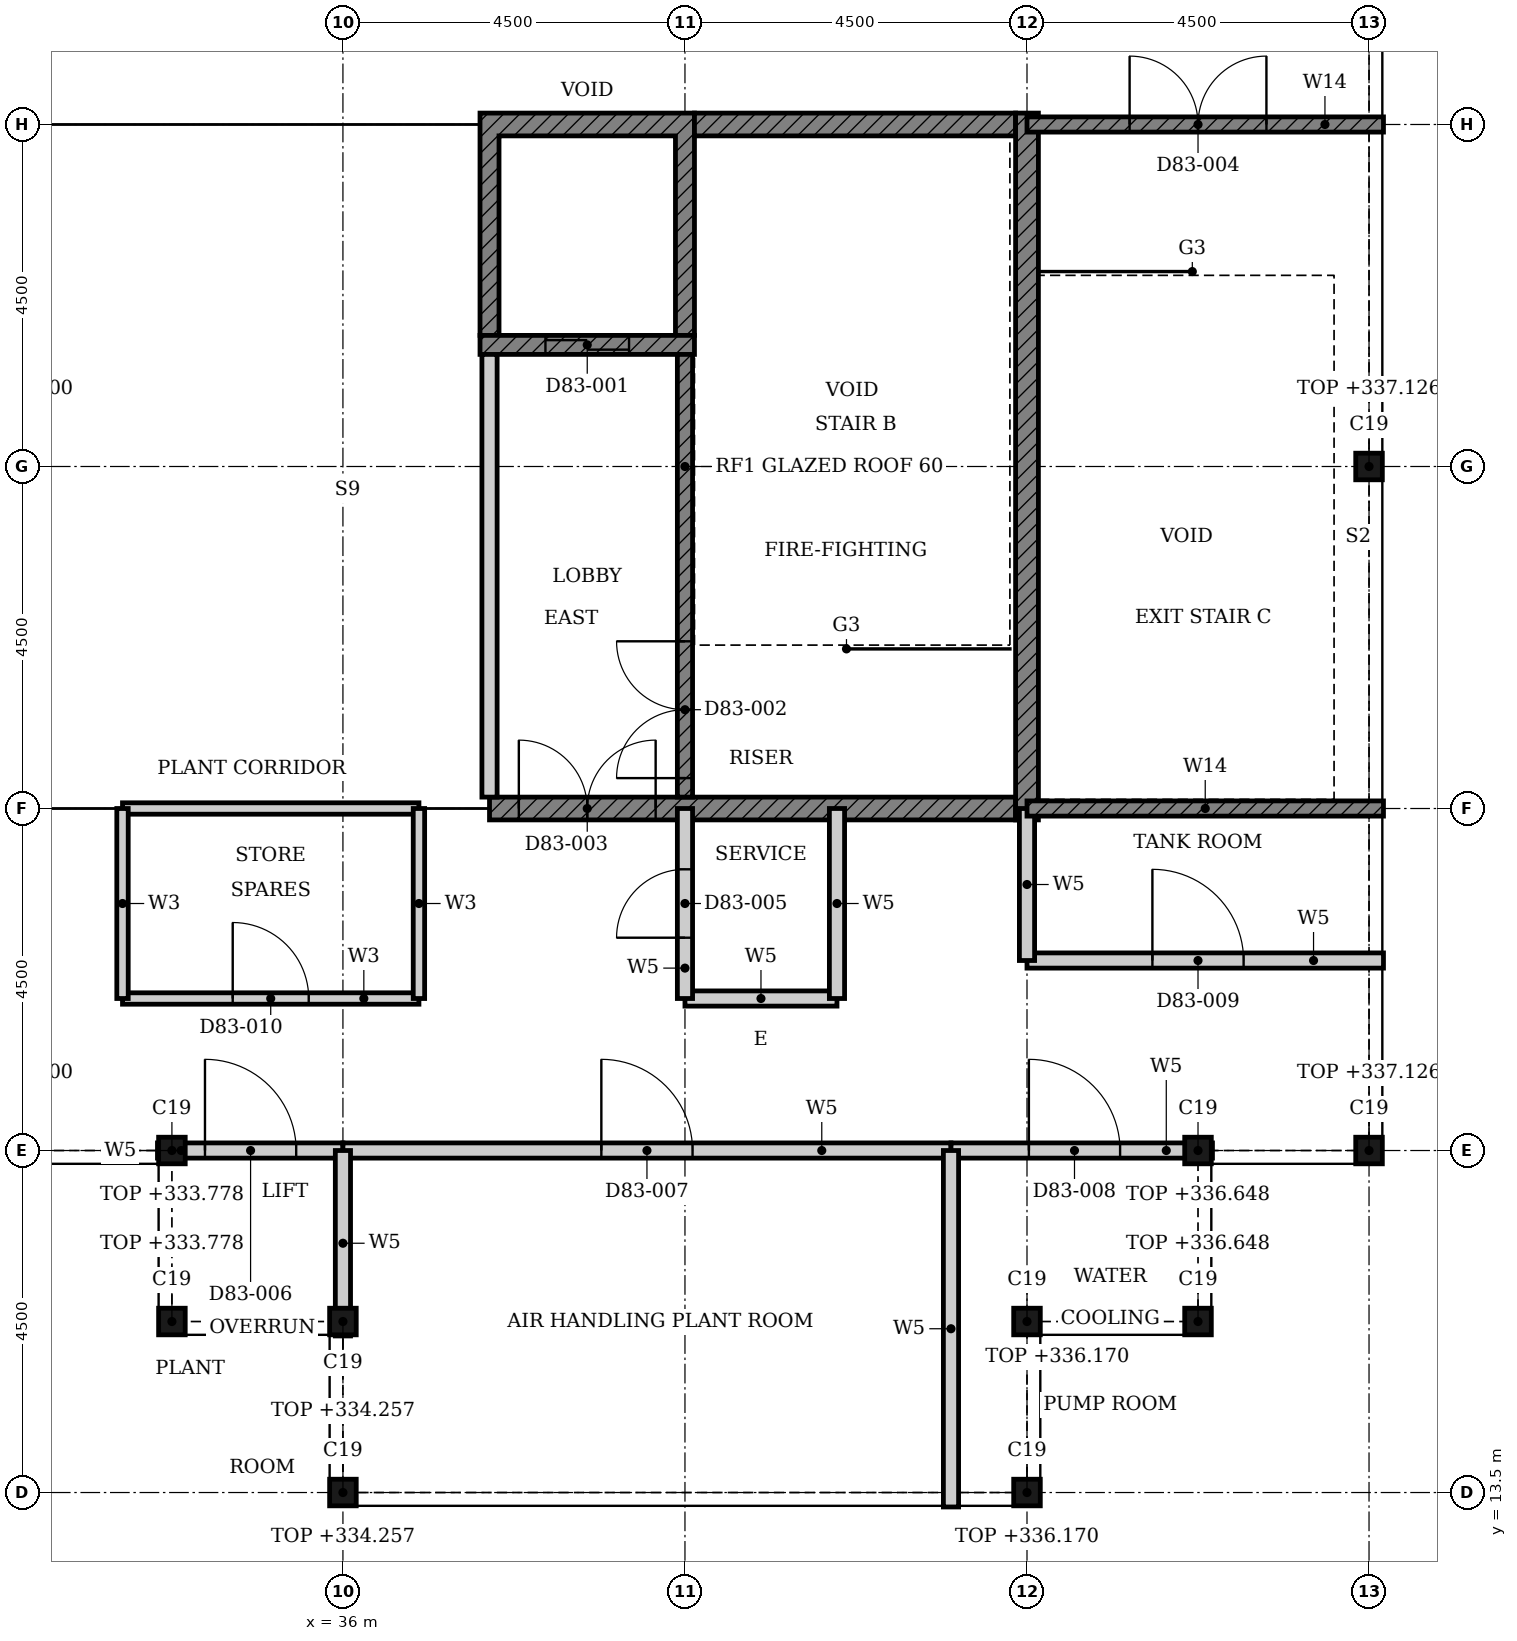
"""IFC4 building model, lengths in metres.
Left out: names, types, materials, properties, quantities, classifications, styles, units other than length and angle.
Written with IfcOpenShell. Run it as: python <this file> out.ifc"""

import sys

from ifc_helpers import new_model, si_unit, direction, frame, frame_2d, origin, origin_2d, place, context, subcontext, project, spatial, polyline, rectangle, i_section, outline, extrude, element, fill, save


model = new_model("IFC4")
c1 = context("Model", 3, precision=1e-05, world=origin(), true_north=direction((0.0, 1.0)))
c2 = subcontext(c1, "Body", "Model", "MODEL_VIEW")
j1 = project(units=[si_unit("LENGTHUNIT", "METRE"), si_unit("PLANEANGLEUNIT", "RADIAN")], contexts=[c1])
p1 = place(None, origin())
s1 = spatial("IfcSite", under=j1, at=p1, CompositionType="ELEMENT")
p2 = place(p1, origin())
s2 = spatial("IfcBuilding", under=s1, at=p2, CompositionType="ELEMENT")
p3 = place(p2, frame((0.0, 0.0, 329.6)))
s3 = spatial("IfcBuildingStorey", under=s2, at=p3, CompositionType="ELEMENT", Elevation=329.6)
for number, where, z_axis, x_axis in (
    (1, (45.0, 13.5, 0.0), (0.0, 0.0, 1.0), (1.0, 0.0, 0.0)),
    (2, (45.0, 15.75, 0.0), (0.0, 0.0, 1.0), (1.0, 0.0, 0.0)),
):
    element("IfcColumn", number, at=place(p3, frame(where, z_axis=z_axis, x_axis=x_axis)), inside=s3, PredefinedType="COLUMN", context=c2, shape_type="SweptSolid", body=[
        extrude(i_section(OverallWidth=0.35, OverallDepth=0.35, WebThickness=0.012, FlangeThickness=0.019, FilletRadius=0.013, at=origin_2d()), origin(), (0.0, 0.0, 1.0), 6.569),
    ])
for number, where, z_axis, x_axis in (
    (3, (47.25, 15.75, 0.0), (0.0, 0.0, 1.0), (1.0, 0.0, 0.0)),
    (4, (47.25, 18.0, 0.0), (0.0, 0.0, 1.0), (1.0, 0.0, 0.0)),
):
    element("IfcColumn", number, at=place(p3, frame(where, z_axis=z_axis, x_axis=x_axis)), inside=s3, PredefinedType="COLUMN", context=c2, shape_type="SweptSolid", body=[
        extrude(i_section(OverallWidth=0.35, OverallDepth=0.35, WebThickness=0.012, FlangeThickness=0.019, FilletRadius=0.013, at=origin_2d()), origin(), (0.0, 0.0, 1.0), 7.048),
    ])
for number, where, z_axis, x_axis in (
    (5, (49.5, 18.0, 0.0), (0.0, 0.0, 1.0), (1.0, 0.0, 0.0)),
    (6, (49.5, 27.0, 0.0), (0.0, 0.0, 1.0), (1.0, 0.0, 0.0)),
):
    element("IfcColumn", number, at=place(p3, frame(where, z_axis=z_axis, x_axis=x_axis)), inside=s3, PredefinedType="COLUMN", context=c2, shape_type="SweptSolid", body=[
        extrude(i_section(OverallWidth=0.35, OverallDepth=0.35, WebThickness=0.012, FlangeThickness=0.019, FilletRadius=0.013, at=origin_2d()), origin(), (0.0, 0.0, 1.0), 7.526),
    ])
for number, where, z_axis, x_axis in (
    (7, (33.75, 18.0, 0.0), (0.0, 0.0, 1.0), (1.0, 0.0, 0.0)),
    (8, (33.75, 15.75, 0.0), (0.0, 0.0, 1.0), (1.0, 0.0, 0.0)),
):
    element("IfcColumn", number, at=place(p3, frame(where, z_axis=z_axis, x_axis=x_axis)), inside=s3, PredefinedType="COLUMN", context=c2, shape_type="SweptSolid", body=[
        extrude(i_section(OverallWidth=0.35, OverallDepth=0.35, WebThickness=0.012, FlangeThickness=0.019, FilletRadius=0.013, at=origin_2d()), origin(), (0.0, 0.0, 1.0), 4.178),
    ])
for number, where, z_axis, x_axis in (
    (9, (36.0, 15.75, 0.0), (0.0, 0.0, 1.0), (1.0, 0.0, 0.0)),
    (10, (36.0, 13.5, 0.0), (0.0, 0.0, 1.0), (1.0, 0.0, 0.0)),
):
    element("IfcColumn", number, at=place(p3, frame(where, z_axis=z_axis, x_axis=x_axis)), inside=s3, PredefinedType="COLUMN", context=c2, shape_type="SweptSolid", body=[
        extrude(i_section(OverallWidth=0.35, OverallDepth=0.35, WebThickness=0.012, FlangeThickness=0.019, FilletRadius=0.013, at=origin_2d()), origin(), (0.0, 0.0, 1.0), 4.656),
    ])
p4 = place(p3, origin())
e11 = element("IfcWall", 11, at=p4, inside=s3, PredefinedType="SHEAR", context=c2, shape_type="SweptSolid", body=[
    extrude(outline(polyline([(37.803, 28.725), (38.053, 28.725), (38.053, 31.35), (40.375, 31.35), (40.375, 28.725), (40.625, 28.725), (40.625, 31.65), (37.803, 31.65), (37.803, 28.725)])), origin(), (0.0, 0.0, 1.0), 3.9),
])
p5 = place(p3, frame((37.928, 22.5, 0.0), z_axis=(0.0, 0.0, 1.0), x_axis=(1.0, 0.0, 0.0)))
e12 = element("IfcWall", 12, at=p5, inside=s3, PredefinedType="SHEAR", context=c2, shape_type="SweptSolid", body=[
    extrude(rectangle(XDim=6.922, YDim=0.3, at=frame_2d((3.461, 0.0))), origin(), (0.0, 0.0, 1.0), 3.9),
])
p6 = place(p5, frame((0.386, 0.0, 0.0)))
e13 = element("IfcOpeningElement", 13, at=p6, cuts=e12, PredefinedType="OPENING", context=c2, shape_type="SweptSolid", body=[
    extrude(rectangle(XDim=1.8, YDim=2.1, at=frame_2d((0.9, 1.05))), frame((0.0, 0.16, 0.0), z_axis=(0.0, -1.0, 0.0), x_axis=(1.0, 0.0, 0.0)), (0.0, 0.0, 1.0), 0.32),
])
p7 = place(p3, frame((40.625, 31.5, 0.0), z_axis=(0.0, 0.0, 1.0), x_axis=(1.0, 0.0, 0.0)))
e14 = element("IfcWall", 14, at=p7, inside=s3, PredefinedType="SHEAR", context=c2, shape_type="SweptSolid", body=[
    extrude(rectangle(XDim=4.225, YDim=0.3, at=frame_2d((2.113, 0.0))), origin(), (0.0, 0.0, 1.0), 3.9),
])
p8 = place(p3, frame((45.0, 22.35, 0.0), z_axis=(0.0, 0.0, 1.0), x_axis=(0.0, 1.0, 0.0)))
e15 = element("IfcWall", 15, at=p8, inside=s3, PredefinedType="SHEAR", context=c2, shape_type="SweptSolid", body=[
    extrude(rectangle(XDim=9.3, YDim=0.3, at=frame_2d((4.65, 0.0))), origin(), (0.0, 0.0, 1.0), 3.9),
])
p9 = place(p3, frame((37.803, 28.6, 0.0), z_axis=(0.0, 0.0, 1.0), x_axis=(1.0, 0.0, 0.0)))
e16 = element("IfcWall", 16, at=p9, inside=s3, PredefinedType="SHEAR", context=c2, shape_type="SweptSolid", body=[
    extrude(rectangle(XDim=2.822, YDim=0.25, at=frame_2d((1.411, 0.0))), origin(), (0.0, 0.0, 1.0), 3.9),
])
p10 = place(p9, frame((0.861, 0.0, 0.0)))
e17 = element("IfcOpeningElement", 17, at=p10, cuts=e16, PredefinedType="OPENING", context=c2, shape_type="SweptSolid", body=[
    extrude(rectangle(XDim=1.1, YDim=2.1, at=frame_2d((0.55, 1.05))), frame((0.0, 0.135, 0.0), z_axis=(0.0, -1.0, 0.0), x_axis=(1.0, 0.0, 0.0)), (0.0, 0.0, 1.0), 0.27),
])
p11 = place(p3, frame((40.5, 22.65, 0.0), z_axis=(0.0, 0.0, 1.0), x_axis=(0.0, 1.0, 0.0)))
e18 = element("IfcWall", 18, at=p11, inside=s3, PredefinedType="SHEAR", context=c2, shape_type="SweptSolid", body=[
    extrude(rectangle(XDim=5.825, YDim=0.2, at=frame_2d((2.913, 0.0))), origin(), (0.0, 0.0, 1.0), 3.9),
])
p12 = place(p11, frame((0.25, 0.0, 0.0)))
e19 = element("IfcOpeningElement", 19, at=p12, cuts=e18, PredefinedType="OPENING", context=c2, shape_type="SweptSolid", body=[
    extrude(rectangle(XDim=1.8, YDim=2.1, at=frame_2d((0.9, 1.05))), frame((0.0, 0.11, 0.0), z_axis=(0.0, -1.0, 0.0), x_axis=(1.0, 0.0, 0.0)), (0.0, 0.0, 1.0), 0.22),
])
p13 = place(p3, frame((37.928, 22.65, 0.0), z_axis=(0.0, 0.0, 1.0), x_axis=(0.0, 1.0, 0.0)))
e20 = element("IfcWall", 20, at=p13, inside=s3, PredefinedType="PARTITIONING", context=c2, shape_type="SweptSolid", body=[
    extrude(rectangle(XDim=5.825, YDim=0.2, at=frame_2d((2.913, 0.0))), origin(), (0.0, 0.0, 1.0), 3.9),
])
p14 = place(p3, frame((33.1, 20.0, 0.0), z_axis=(0.0, 0.0, 1.0), x_axis=(1.0, 0.0, 0.0)))
e21 = element("IfcWall", 21, at=p14, inside=s3, PredefinedType="PARTITIONING", context=c2, shape_type="SweptSolid", body=[
    extrude(rectangle(XDim=3.9, YDim=0.15, at=frame_2d((1.95, 0.0))), origin(), (0.0, 0.0, 1.0), 3.9),
])
p15 = place(p14, frame((1.45, 0.0, 0.0)))
e22 = element("IfcOpeningElement", 22, at=p15, cuts=e21, PredefinedType="OPENING", context=c2, shape_type="SweptSolid", body=[
    extrude(rectangle(XDim=1.0, YDim=2.1, at=frame_2d((0.5, 1.05))), frame((0.0, 0.085, 0.0), z_axis=(0.0, -1.0, 0.0), x_axis=(1.0, 0.0, 0.0)), (0.0, 0.0, 1.0), 0.17),
])
p16 = place(p3, frame((33.1, 22.5, 0.0), z_axis=(0.0, 0.0, 1.0), x_axis=(1.0, 0.0, 0.0)))
e23 = element("IfcWall", 23, at=p16, inside=s3, PredefinedType="PARTITIONING", context=c2, shape_type="SweptSolid", body=[
    extrude(rectangle(XDim=3.9, YDim=0.15, at=frame_2d((1.95, 0.0))), origin(), (0.0, 0.0, 1.0), 3.9),
])
for number, where, z_axis, x_axis in (
    (24, (33.1, 20.0, 0.0), (0.0, 0.0, 1.0), (0.0, 1.0, 0.0)),
    (25, (37.0, 20.0, 0.0), (0.0, 0.0, 1.0), (0.0, 1.0, 0.0)),
):
    element("IfcWall", number, at=place(p3, frame(where, z_axis=z_axis, x_axis=x_axis)), inside=s3, PredefinedType="PARTITIONING", context=c2, shape_type="SweptSolid", body=[
        extrude(rectangle(XDim=2.5, YDim=0.15, at=frame_2d((1.25, 0.0))), origin(), (0.0, 0.0, 1.0), 3.9),
    ])
p17 = place(p3, frame((33.56, 18.0, 0.0), z_axis=(0.0, 0.0, 1.0), x_axis=(1.0, 0.0, 0.0)))
e26 = element("IfcWall", 26, at=p17, inside=s3, PredefinedType="PARTITIONING", context=c2, shape_type="SweptSolid", body=[
    extrude(rectangle(XDim=2.44, YDim=0.2, at=frame_2d((1.22, 0.0))), origin(), (0.0, 0.0, 1.0), 3.9),
])
p18 = place(p17, frame((0.625, 0.0, 0.0)))
e27 = element("IfcOpeningElement", 27, at=p18, cuts=e26, PredefinedType="OPENING", context=c2, shape_type="SweptSolid", body=[
    extrude(rectangle(XDim=1.2, YDim=2.1, at=frame_2d((0.6, 1.05))), frame((0.0, 0.11, 0.0), z_axis=(0.0, -1.0, 0.0), x_axis=(1.0, 0.0, 0.0)), (0.0, 0.0, 1.0), 0.22),
])
p19 = place(p3, frame((36.0, 18.0, 0.0), z_axis=(0.0, 0.0, 1.0), x_axis=(1.0, 0.0, 0.0)))
e28 = element("IfcWall", 28, at=p19, inside=s3, PredefinedType="PARTITIONING", context=c2, shape_type="SweptSolid", body=[
    extrude(rectangle(XDim=8.0, YDim=0.2, at=frame_2d((4.0, 0.0))), origin(), (0.0, 0.0, 1.0), 3.9),
])
p20 = place(p19, frame((3.4, 0.0, 0.0)))
e29 = element("IfcOpeningElement", 29, at=p20, cuts=e28, PredefinedType="OPENING", context=c2, shape_type="SweptSolid", body=[
    extrude(rectangle(XDim=1.2, YDim=2.1, at=frame_2d((0.6, 1.05))), frame((0.0, 0.11, 0.0), z_axis=(0.0, -1.0, 0.0), x_axis=(1.0, 0.0, 0.0)), (0.0, 0.0, 1.0), 0.22),
])
p21 = place(p3, frame((44.0, 18.0, 0.0), z_axis=(0.0, 0.0, 1.0), x_axis=(1.0, 0.0, 0.0)))
e30 = element("IfcWall", 30, at=p21, inside=s3, PredefinedType="PARTITIONING", context=c2, shape_type="SweptSolid", body=[
    extrude(rectangle(XDim=3.44, YDim=0.2, at=frame_2d((1.72, 0.0))), origin(), (0.0, 0.0, 1.0), 3.9),
])
p22 = place(p21, frame((1.025, 0.0, 0.0)))
e31 = element("IfcOpeningElement", 31, at=p22, cuts=e30, PredefinedType="OPENING", context=c2, shape_type="SweptSolid", body=[
    extrude(rectangle(XDim=1.2, YDim=2.1, at=frame_2d((0.6, 1.05))), frame((0.0, 0.11, 0.0), z_axis=(0.0, -1.0, 0.0), x_axis=(1.0, 0.0, 0.0)), (0.0, 0.0, 1.0), 0.22),
])
p23 = place(p3, frame((40.5, 20.0, 0.0), z_axis=(0.0, 0.0, 1.0), x_axis=(1.0, 0.0, 0.0)))
e32 = element("IfcWall", 32, at=p23, inside=s3, PredefinedType="PARTITIONING", context=c2, shape_type="SweptSolid", body=[
    extrude(rectangle(XDim=2.0, YDim=0.2, at=frame_2d((1.0, 0.0))), origin(), (0.0, 0.0, 1.0), 3.9),
])
p24 = place(p3, frame((45.0, 20.5, 0.0), z_axis=(0.0, 0.0, 1.0), x_axis=(1.0, 0.0, 0.0)))
e33 = element("IfcWall", 33, at=p24, inside=s3, PredefinedType="PARTITIONING", context=c2, shape_type="SweptSolid", body=[
    extrude(rectangle(XDim=4.69, YDim=0.2, at=frame_2d((2.345, 0.0))), origin(), (0.0, 0.0, 1.0), 3.9),
])
p25 = place(p24, frame((1.65, 0.0, 0.0)))
e34 = element("IfcOpeningElement", 34, at=p25, cuts=e33, PredefinedType="OPENING", context=c2, shape_type="SweptSolid", body=[
    extrude(rectangle(XDim=1.2, YDim=2.1, at=frame_2d((0.6, 1.05))), frame((0.0, 0.11, 0.0), z_axis=(0.0, -1.0, 0.0), x_axis=(1.0, 0.0, 0.0)), (0.0, 0.0, 1.0), 0.22),
])
p26 = place(p3, frame((36.0, 15.56, 0.0), z_axis=(0.0, 0.0, 1.0), x_axis=(0.0, 1.0, 0.0)))
e35 = element("IfcWall", 35, at=p26, inside=s3, PredefinedType="PARTITIONING", context=c2, shape_type="SweptSolid", body=[
    extrude(rectangle(XDim=2.44, YDim=0.2, at=frame_2d((1.22, 0.0))), origin(), (0.0, 0.0, 1.0), 3.9),
])
p27 = place(p3, frame((40.5, 20.0, 0.0), z_axis=(0.0, 0.0, 1.0), x_axis=(0.0, 1.0, 0.0)))
e36 = element("IfcWall", 36, at=p27, inside=s3, PredefinedType="PARTITIONING", context=c2, shape_type="SweptSolid", body=[
    extrude(rectangle(XDim=2.5, YDim=0.2, at=frame_2d((1.25, 0.0))), origin(), (0.0, 0.0, 1.0), 3.9),
])
p28 = place(p27, frame((0.8, 0.0, 0.0)))
e37 = element("IfcOpeningElement", 37, at=p28, cuts=e36, PredefinedType="OPENING", context=c2, shape_type="SweptSolid", body=[
    extrude(rectangle(XDim=0.9, YDim=2.1, at=frame_2d((0.45, 1.05))), frame((0.0, 0.11, 0.0), z_axis=(0.0, -1.0, 0.0), x_axis=(1.0, 0.0, 0.0)), (0.0, 0.0, 1.0), 0.22),
])
p29 = place(p3, frame((42.5, 20.0, 0.0), z_axis=(0.0, 0.0, 1.0), x_axis=(0.0, 1.0, 0.0)))
e38 = element("IfcWall", 38, at=p29, inside=s3, PredefinedType="PARTITIONING", context=c2, shape_type="SweptSolid", body=[
    extrude(rectangle(XDim=2.5, YDim=0.2, at=frame_2d((1.25, 0.0))), origin(), (0.0, 0.0, 1.0), 3.9),
])
p30 = place(p3, frame((44.0, 13.31, 0.0), z_axis=(0.0, 0.0, 1.0), x_axis=(0.0, 1.0, 0.0)))
e39 = element("IfcWall", 39, at=p30, inside=s3, PredefinedType="PARTITIONING", context=c2, shape_type="SweptSolid", body=[
    extrude(rectangle(XDim=4.69, YDim=0.2, at=frame_2d((2.345, 0.0))), origin(), (0.0, 0.0, 1.0), 3.9),
])
p31 = place(p3, frame((45.0, 20.5, 0.0), z_axis=(0.0, 0.0, 1.0), x_axis=(0.0, 1.0, 0.0)))
e40 = element("IfcWall", 40, at=p31, inside=s3, PredefinedType="PARTITIONING", context=c2, shape_type="SweptSolid", body=[
    extrude(rectangle(XDim=2.0, YDim=0.2, at=frame_2d((1.0, 0.0))), origin(), (0.0, 0.0, 1.0), 3.9),
])
p32 = place(p3, frame((45.0, 22.5, 0.0), z_axis=(0.0, 0.0, 1.0), x_axis=(1.0, 0.0, 0.0)))
e41 = element("IfcWall", 41, at=p32, inside=s3, PredefinedType="SHEAR", context=c2, shape_type="SweptSolid", body=[
    extrude(rectangle(XDim=4.69, YDim=0.2, at=frame_2d((2.345, 0.0))), origin(), (0.0, 0.0, 1.0), 3.9),
])
p33 = place(p3, frame((45.0, 31.5, 0.0), z_axis=(0.0, 0.0, 1.0), x_axis=(1.0, 0.0, 0.0)))
e42 = element("IfcWall", 42, at=p33, inside=s3, PredefinedType="SHEAR", context=c2, shape_type="SweptSolid", body=[
    extrude(rectangle(XDim=4.69, YDim=0.2, at=frame_2d((2.345, 0.0))), origin(), (0.0, 0.0, 1.0), 3.9),
])
p34 = place(p33, frame((1.35, 0.0, 0.0)))
e43 = element("IfcOpeningElement", 43, at=p34, cuts=e42, PredefinedType="OPENING", context=c2, shape_type="SweptSolid", body=[
    extrude(rectangle(XDim=1.8, YDim=2.1, at=frame_2d((0.9, 1.05))), frame((0.0, 0.11, 0.0), z_axis=(0.0, -1.0, 0.0), x_axis=(1.0, 0.0, 0.0)), (0.0, 0.0, 1.0), 0.22),
])
p35 = place(p10, origin())
e44 = element("IfcDoor", 44, at=p35, inside=s3, OperationType="DOUBLE_DOOR_SLIDING", PredefinedType="DOOR", context=c2, shape_type="SweptSolid", body=[
    extrude(rectangle(XDim=1.1, YDim=2.1, at=frame_2d((0.55, 1.05))), frame((0.0, 0.025, 0.0), z_axis=(0.0, -1.0, 0.0), x_axis=(1.0, 0.0, 0.0)), (0.0, 0.0, 1.0), 0.05),
])
fill(e17, e44)
p36 = place(p12, origin())
e45 = element("IfcDoor", 45, at=p36, inside=s3, OperationType="DOUBLE_DOOR_SINGLE_SWING", PredefinedType="DOOR", context=c2, shape_type="SweptSolid", body=[
    extrude(rectangle(XDim=1.8, YDim=2.1, at=frame_2d((0.9, 1.05))), frame((0.0, 0.025, 0.0), z_axis=(0.0, -1.0, 0.0), x_axis=(1.0, 0.0, 0.0)), (0.0, 0.0, 1.0), 0.05),
])
fill(e19, e45)
p37 = place(p6, origin())
e46 = element("IfcDoor", 46, at=p37, inside=s3, OperationType="DOUBLE_DOOR_SINGLE_SWING", PredefinedType="DOOR", context=c2, shape_type="SweptSolid", body=[
    extrude(rectangle(XDim=1.8, YDim=2.1, at=frame_2d((0.9, 1.05))), frame((0.0, 0.025, 0.0), z_axis=(0.0, -1.0, 0.0), x_axis=(1.0, 0.0, 0.0)), (0.0, 0.0, 1.0), 0.05),
])
fill(e13, e46)
p38 = place(p34, origin())
e47 = element("IfcDoor", 47, at=p38, inside=s3, OperationType="DOUBLE_DOOR_SINGLE_SWING", PredefinedType="DOOR", context=c2, shape_type="SweptSolid", body=[
    extrude(rectangle(XDim=1.8, YDim=2.1, at=frame_2d((0.9, 1.05))), frame((0.0, 0.025, 0.0), z_axis=(0.0, -1.0, 0.0), x_axis=(1.0, 0.0, 0.0)), (0.0, 0.0, 1.0), 0.05),
])
fill(e43, e47)
p39 = place(p28, origin())
e48 = element("IfcDoor", 48, at=p39, inside=s3, OperationType="SINGLE_SWING_LEFT", PredefinedType="DOOR", context=c2, shape_type="SweptSolid", body=[
    extrude(rectangle(XDim=0.9, YDim=2.1, at=frame_2d((0.45, 1.05))), frame((0.0, 0.025, 0.0), z_axis=(0.0, -1.0, 0.0), x_axis=(1.0, 0.0, 0.0)), (0.0, 0.0, 1.0), 0.05),
])
fill(e37, e48)
p40 = place(p18, origin())
e49 = element("IfcDoor", 49, at=p40, inside=s3, OperationType="SINGLE_SWING_RIGHT", PredefinedType="DOOR", context=c2, shape_type="SweptSolid", body=[
    extrude(rectangle(XDim=1.2, YDim=2.1, at=frame_2d((0.6, 1.05))), frame((0.0, 0.025, 0.0), z_axis=(0.0, -1.0, 0.0), x_axis=(1.0, 0.0, 0.0)), (0.0, 0.0, 1.0), 0.05),
])
fill(e27, e49)
p41 = place(p20, origin())
e50 = element("IfcDoor", 50, at=p41, inside=s3, OperationType="SINGLE_SWING_LEFT", PredefinedType="DOOR", context=c2, shape_type="SweptSolid", body=[
    extrude(rectangle(XDim=1.2, YDim=2.1, at=frame_2d((0.6, 1.05))), frame((0.0, 0.025, 0.0), z_axis=(0.0, -1.0, 0.0), x_axis=(1.0, 0.0, 0.0)), (0.0, 0.0, 1.0), 0.05),
])
fill(e29, e50)
p42 = place(p22, origin())
e51 = element("IfcDoor", 51, at=p42, inside=s3, OperationType="SINGLE_SWING_RIGHT", PredefinedType="DOOR", context=c2, shape_type="SweptSolid", body=[
    extrude(rectangle(XDim=1.2, YDim=2.1, at=frame_2d((0.6, 1.05))), frame((0.0, 0.025, 0.0), z_axis=(0.0, -1.0, 0.0), x_axis=(1.0, 0.0, 0.0)), (0.0, 0.0, 1.0), 0.05),
])
fill(e31, e51)
p43 = place(p25, origin())
e52 = element("IfcDoor", 52, at=p43, inside=s3, OperationType="SINGLE_SWING_RIGHT", PredefinedType="DOOR", context=c2, shape_type="SweptSolid", body=[
    extrude(rectangle(XDim=1.2, YDim=2.1, at=frame_2d((0.6, 1.05))), frame((0.0, 0.025, 0.0), z_axis=(0.0, -1.0, 0.0), x_axis=(1.0, 0.0, 0.0)), (0.0, 0.0, 1.0), 0.05),
])
fill(e34, e52)
p44 = place(p15, origin())
e53 = element("IfcDoor", 53, at=p44, inside=s3, OperationType="SINGLE_SWING_LEFT", PredefinedType="DOOR", context=c2, shape_type="SweptSolid", body=[
    extrude(rectangle(XDim=1.0, YDim=2.1, at=frame_2d((0.5, 1.05))), frame((0.0, 0.025, 0.0), z_axis=(0.0, -1.0, 0.0), x_axis=(1.0, 0.0, 0.0)), (0.0, 0.0, 1.0), 0.05),
])
fill(e22, e53)
save(model, sys.argv[1])
